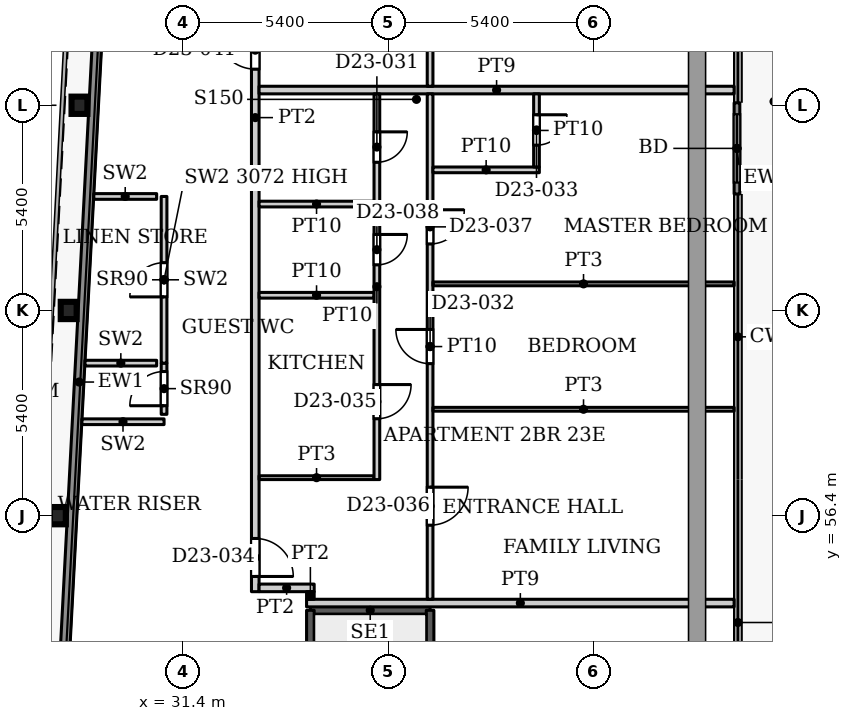
"""IFC4 building model, lengths in metres.
Left out: names, types, materials, properties, quantities, classifications, styles, units other than length and angle.
Written with IfcOpenShell. Run it as: python <this file> out.ifc"""

import sys

from ifc_helpers import new_model, si_unit, direction, frame, frame_2d, origin, origin_2d, place, context, subcontext, project, spatial, rectangle, i_section, extrude, source, transform, mapped, element, fill, save


model = new_model("IFC4")
c1 = context("Model", 3, precision=1e-05, world=origin(), true_north=direction((0.0, 1.0)))
c2 = subcontext(c1, "Body", "Model", "MODEL_VIEW")
j1 = project(units=[si_unit("LENGTHUNIT", "METRE"), si_unit("PLANEANGLEUNIT", "RADIAN")], contexts=[c1])
p1 = place(None, origin())
s1 = spatial("IfcSite", under=j1, at=p1, CompositionType="ELEMENT")
p2 = place(p1, origin())
s2 = spatial("IfcBuilding", under=s1, at=p2, CompositionType="ELEMENT")
p3 = place(p2, frame((0.0, 0.0, 101.9)))
s3 = spatial("IfcBuildingStorey", under=s2, at=p3, CompositionType="ELEMENT", Elevation=101.9)
for number, where, z_axis, x_axis in (
    (1, (28.106, 56.4, 0.0), (0.0, 0.0, 1.0), (1.0, 0.0, 0.0)),
    (2, (28.39, 61.8, 0.0), (0.0, 0.0, 1.0), (1.0, 0.0, 0.0)),
    (3, (28.674, 67.2, 0.0), (0.0, 0.0, 1.0), (1.0, 0.0, 0.0)),
):
    element("IfcColumn", number, at=place(p3, frame(where, z_axis=z_axis, x_axis=x_axis)), inside=s3, PredefinedType="COLUMN", context=c2, shape_type="SweptSolid", body=[
        extrude(i_section(OverallWidth=0.418, OverallDepth=0.455, WebThickness=0.042, FlangeThickness=0.068, FilletRadius=0.014, at=origin_2d()), origin(), (0.0, 0.0, 1.0), 3.9),
    ])
p4 = place(p3, frame((45.975, 67.265, 0.0), z_axis=(0.0, 0.0, 1.0), x_axis=(0.0, -1.0, 0.0)))
e4 = element("IfcWall", 4, at=p4, inside=s3, PredefinedType="SOLIDWALL", context=c2, shape_type="SweptSolid", body=[
    extrude(rectangle(XDim=2.4, YDim=0.15, at=frame_2d((1.2, 0.0))), origin(), (0.0, 0.0, 1.0), 3.75),
])
p5 = place(p4, frame((0.3, 0.0, 0.0)))
e5 = element("IfcOpeningElement", 5, at=p5, cuts=e4, PredefinedType="OPENING", context=c2, shape_type="SweptSolid", body=[
    extrude(rectangle(XDim=1.8, YDim=2.4, at=frame_2d((0.9, 1.2))), frame((0.0, 0.085, 0.0), z_axis=(0.0, -1.0, 0.0), x_axis=(1.0, 0.0, 0.0)), (0.0, 0.0, 1.0), 0.17),
])
p6 = place(p3, frame((27.195, 31.969, 0.0), z_axis=(0.0, 0.0, 1.0), x_axis=(0.052559748861, 0.998617781135, 0.0)))
e6 = element("IfcWall", 6, at=p6, inside=s3, PredefinedType="SOLIDWALL", context=c2, shape_type="SweptSolid", body=[
    extrude(rectangle(XDim=55.972, YDim=0.25, at=frame_2d((27.986, 0.0))), origin(), (0.0, 0.0, 1.0), 3.75),
])
p7 = place(p3, frame((34.75, 53.91, 0.0), z_axis=(0.0, 0.0, 1.0), x_axis=(1.0, 0.0, 0.0)))
e7 = element("IfcWall", 7, at=p7, inside=s3, PredefinedType="SHEAR", context=c2, shape_type="SweptSolid", body=[
    extrude(rectangle(XDim=3.15, YDim=0.2, at=frame_2d((1.575, 0.0))), origin(), (0.0, 0.0, 1.0), 3.9),
])
p8 = place(p3, frame((34.75, 47.5, 0.0), z_axis=(0.0, 0.0, 1.0), x_axis=(0.0, 1.0, 0.0)))
e8 = element("IfcWall", 8, at=p8, inside=s3, PredefinedType="SHEAR", context=c2, shape_type="SweptSolid", body=[
    extrude(rectangle(XDim=6.41, YDim=0.2, at=frame_2d((3.205, 0.0))), origin(), (0.0, 0.0, 1.0), 3.9),
])
p9 = place(p3, frame((37.9, 44.75, 0.0), z_axis=(0.0, 0.0, 1.0), x_axis=(0.0, 1.0, 0.0)))
e9 = element("IfcWall", 9, at=p9, inside=s3, PredefinedType="SHEAR", context=c2, shape_type="SweptSolid", body=[
    extrude(rectangle(XDim=9.16, YDim=0.2, at=frame_2d((4.58, 0.0))), origin(), (0.0, 0.0, 1.0), 3.9),
])
p10 = place(p3, frame((28.739, 58.872, 0.0), z_axis=(0.0, 0.0, 1.0), x_axis=(1.0, 0.0, 0.0)))
e10 = element("IfcWall", 10, at=p10, inside=s3, PredefinedType="PARTITIONING", context=c2, shape_type="SweptSolid", body=[
    extrude(rectangle(XDim=2.161, YDim=0.15, at=frame_2d((1.081, 0.0))), origin(), (0.0, 0.0, 1.0), 3.9),
])
p11 = place(p3, frame((30.9, 59.067, 0.0), z_axis=(0.0, 0.0, 1.0), x_axis=(0.0, 1.0, 0.0)))
e11 = element("IfcWall", 11, at=p11, inside=s3, PredefinedType="PARTITIONING", context=c2, shape_type="SweptSolid", body=[
    extrude(rectangle(XDim=1.347, YDim=0.15, at=frame_2d((0.674, 0.0))), origin(), (0.0, 0.0, 1.0), 3.9),
])
p12 = place(p11, frame((0.226, 0.0, 0.0)))
e12 = element("IfcOpeningElement", 12, at=p12, cuts=e11, PredefinedType="OPENING", context=c2, shape_type="SweptSolid", body=[
    extrude(rectangle(XDim=0.9, YDim=2.2, at=frame_2d((0.45, 1.1))), frame((0.0, 0.085, 0.0), z_axis=(0.0, -1.0, 0.0), x_axis=(1.0, 0.0, 0.0)), (0.0, 0.0, 1.0), 0.17),
])
p13 = place(p3, frame((28.82, 60.414, 0.0), z_axis=(0.0, 0.0, 1.0), x_axis=(1.0, 0.0, 0.0)))
e13 = element("IfcWall", 13, at=p13, inside=s3, PredefinedType="PARTITIONING", context=c2, shape_type="SweptSolid", body=[
    extrude(rectangle(XDim=1.885, YDim=0.15, at=frame_2d((0.942, 0.0))), origin(), (0.0, 0.0, 1.0), 3.9),
])
p14 = place(p3, frame((30.9, 60.414, 0.0), z_axis=(0.0, 0.0, 1.0), x_axis=(0.0, 1.0, 0.0)))
e14 = element("IfcWall", 14, at=p14, inside=s3, PredefinedType="PARTITIONING", context=c2, shape_type="SweptSolid", body=[
    extrude(rectangle(XDim=4.386, YDim=0.15, at=frame_2d((2.193, 0.0))), origin(), (0.0, 0.0, 1.0), 3.072),
])
p15 = place(p14, frame((1.743, 0.0, 0.0)))
e15 = element("IfcOpeningElement", 15, at=p15, cuts=e14, PredefinedType="OPENING", context=c2, shape_type="SweptSolid", body=[
    extrude(rectangle(XDim=0.9, YDim=2.2, at=frame_2d((0.45, 1.1))), frame((0.0, 0.085, 0.0), z_axis=(0.0, -1.0, 0.0), x_axis=(1.0, 0.0, 0.0)), (0.0, 0.0, 1.0), 0.17),
])
p16 = place(p3, frame((29.051, 64.8, 0.0), z_axis=(0.0, 0.0, 1.0), x_axis=(1.0, 0.0, 0.0)))
e16 = element("IfcWall", 16, at=p16, inside=s3, PredefinedType="PARTITIONING", context=c2, shape_type="SweptSolid", body=[
    extrude(rectangle(XDim=1.654, YDim=0.15, at=frame_2d((0.827, 0.0))), origin(), (0.0, 0.0, 1.0), 3.9),
])
p17 = place(p3, frame((33.3, 54.4, 0.0), z_axis=(0.0, 0.0, 1.0), x_axis=(0.0, 1.0, 0.0)))
e17 = element("IfcWall", 17, at=p17, inside=s3, PredefinedType="PARTITIONING", context=c2, shape_type="SweptSolid", body=[
    extrude(rectangle(XDim=24.95, YDim=0.2, at=frame_2d((12.475, 0.0))), origin(), (0.0, 0.0, 1.0), 3.6),
])
p18 = place(p17, frame((0.4, 0.0, 0.0)))
e18 = element("IfcOpeningElement", 18, at=p18, cuts=e17, PredefinedType="OPENING", context=c2, shape_type="SweptSolid", body=[
    extrude(rectangle(XDim=1.0, YDim=2.1, at=frame_2d((0.5, 1.05))), frame((0.0, 0.11, 0.0), z_axis=(0.0, -1.0, 0.0), x_axis=(1.0, 0.0, 0.0)), (0.0, 0.0, 1.0), 0.22),
])
p19 = place(p17, frame((13.75, 0.0, 0.0)))
e19 = element("IfcOpeningElement", 19, at=p19, cuts=e17, PredefinedType="OPENING", context=c2, shape_type="SweptSolid", body=[
    extrude(rectangle(XDim=1.0, YDim=2.1, at=frame_2d((0.5, 1.05))), frame((0.0, 0.11, 0.0), z_axis=(0.0, -1.0, 0.0), x_axis=(1.0, 0.0, 0.0)), (0.0, 0.0, 1.0), 0.22),
])
p20 = place(p3, frame((33.4, 54.5, 0.0), z_axis=(0.0, 0.0, 1.0), x_axis=(1.0, 0.0, 0.0)))
e20 = element("IfcWall", 20, at=p20, inside=s3, PredefinedType="PARTITIONING", context=c2, shape_type="SweptSolid", body=[
    extrude(rectangle(XDim=1.45, YDim=0.2, at=frame_2d((0.725, 0.0))), origin(), (0.0, 0.0, 1.0), 3.6),
])
p21 = place(p3, frame((33.4, 57.4, 0.0), z_axis=(0.0, 0.0, 1.0), x_axis=(1.0, 0.0, 0.0)))
e21 = element("IfcWall", 21, at=p21, inside=s3, PredefinedType="PARTITIONING", context=c2, shape_type="SweptSolid", body=[
    extrude(rectangle(XDim=3.025, YDim=0.1, at=frame_2d((1.513, 0.0))), origin(), (0.0, 0.0, 1.0), 3.6),
])
for number, where, z_axis, x_axis in (
    (22, (33.4, 62.2, 0.0), (0.0, 0.0, 1.0), (1.0, 0.0, 0.0)),
    (23, (33.4, 64.6, 0.0), (0.0, 0.0, 1.0), (1.0, 0.0, 0.0)),
):
    element("IfcWall", number, at=place(p3, frame(where, z_axis=z_axis, x_axis=x_axis)), inside=s3, PredefinedType="PARTITIONING", context=c2, shape_type="SweptSolid", body=[
        extrude(rectangle(XDim=3.025, YDim=0.15, at=frame_2d((1.513, 0.0))), origin(), (0.0, 0.0, 1.0), 3.6),
    ])
p22 = place(p3, frame((33.4, 67.6, 0.0), z_axis=(0.0, 0.0, 1.0), x_axis=(1.0, 0.0, 0.0)))
e24 = element("IfcWall", 24, at=p22, inside=s3, PredefinedType="PARTITIONING", context=c2, shape_type="SweptSolid", body=[
    extrude(rectangle(XDim=12.5, YDim=0.2, at=frame_2d((6.25, 0.0))), origin(), (0.0, 0.0, 1.0), 3.6),
])
p23 = place(p3, frame((34.65, 54.1, 0.0), z_axis=(0.0, 0.0, 1.0), x_axis=(1.0, 0.0, 0.0)))
e25 = element("IfcWall", 25, at=p23, inside=s3, PredefinedType="PARTITIONING", context=c2, shape_type="SweptSolid", body=[
    extrude(rectangle(XDim=11.25, YDim=0.2, at=frame_2d((5.625, 0.0))), origin(), (0.0, 0.0, 1.0), 3.6),
])
p24 = place(p3, frame((34.75, 54.2, 0.0), z_axis=(0.0, 0.0, 1.0), x_axis=(0.0, 1.0, 0.0)))
e26 = element("IfcWall", 26, at=p24, inside=s3, PredefinedType="PARTITIONING", context=c2, shape_type="SweptSolid", body=[
    extrude(rectangle(XDim=0.2, YDim=0.2, at=frame_2d((0.1, 0.0))), origin(), (0.0, 0.0, 1.0), 3.6),
])
p25 = place(p3, frame((36.5, 57.35, 0.0), z_axis=(0.0, 0.0, 1.0), x_axis=(0.0, 1.0, 0.0)))
e27 = element("IfcWall", 27, at=p25, inside=s3, PredefinedType="PARTITIONING", context=c2, shape_type="SweptSolid", body=[
    extrude(rectangle(XDim=10.15, YDim=0.15, at=frame_2d((5.075, 0.0))), origin(), (0.0, 0.0, 1.0), 3.6),
])
p26 = place(p25, frame((8.35, 0.0, 0.0)))
e28 = element("IfcOpeningElement", 28, at=p26, cuts=e27, PredefinedType="OPENING", context=c2, shape_type="SweptSolid", body=[
    extrude(rectangle(XDim=0.8, YDim=2.1, at=frame_2d((0.4, 1.05))), frame((0.0, 0.085, 0.0), z_axis=(0.0, -1.0, 0.0), x_axis=(1.0, 0.0, 0.0)), (0.0, 0.0, 1.0), 0.17),
])
p27 = place(p25, frame((1.6, 0.0, 0.0)))
e29 = element("IfcOpeningElement", 29, at=p27, cuts=e27, PredefinedType="OPENING", context=c2, shape_type="SweptSolid", body=[
    extrude(rectangle(XDim=0.9, YDim=2.1, at=frame_2d((0.45, 1.05))), frame((0.0, 0.085, 0.0), z_axis=(0.0, -1.0, 0.0), x_axis=(1.0, 0.0, 0.0)), (0.0, 0.0, 1.0), 0.17),
])
p28 = place(p25, frame((5.65, 0.0, 0.0)))
e30 = element("IfcOpeningElement", 30, at=p28, cuts=e27, PredefinedType="OPENING", context=c2, shape_type="SweptSolid", body=[
    extrude(rectangle(XDim=0.8, YDim=2.1, at=frame_2d((0.4, 1.05))), frame((0.0, 0.085, 0.0), z_axis=(0.0, -1.0, 0.0), x_axis=(1.0, 0.0, 0.0)), (0.0, 0.0, 1.0), 0.17),
])
p29 = place(p3, frame((37.9, 54.2, 0.0), z_axis=(0.0, 0.0, 1.0), x_axis=(0.0, 1.0, 0.0)))
e31 = element("IfcWall", 31, at=p29, inside=s3, PredefinedType="PARTITIONING", context=c2, shape_type="SweptSolid", body=[
    extrude(rectangle(XDim=13.3, YDim=0.15, at=frame_2d((6.65, 0.0))), origin(), (0.0, 0.0, 1.0), 3.6),
])
p30 = place(p29, frame((6.2, 0.0, 0.0)))
e32 = element("IfcOpeningElement", 32, at=p30, cuts=e31, PredefinedType="OPENING", context=c2, shape_type="SweptSolid", body=[
    extrude(rectangle(XDim=0.9, YDim=2.1, at=frame_2d((0.45, 1.05))), frame((0.0, 0.085, 0.0), z_axis=(0.0, -1.0, 0.0), x_axis=(1.0, 0.0, 0.0)), (0.0, 0.0, 1.0), 0.17),
])
p31 = place(p29, frame((1.95, 0.0, 0.0)))
e33 = element("IfcOpeningElement", 33, at=p31, cuts=e31, PredefinedType="OPENING", context=c2, shape_type="SweptSolid", body=[
    extrude(rectangle(XDim=1.0, YDim=2.1, at=frame_2d((0.5, 1.05))), frame((0.0, 0.085, 0.0), z_axis=(0.0, -1.0, 0.0), x_axis=(1.0, 0.0, 0.0)), (0.0, 0.0, 1.0), 0.17),
])
p32 = place(p29, frame((9.35, 0.0, 0.0)))
e34 = element("IfcOpeningElement", 34, at=p32, cuts=e31, PredefinedType="OPENING", context=c2, shape_type="SweptSolid", body=[
    extrude(rectangle(XDim=0.9, YDim=2.1, at=frame_2d((0.45, 1.05))), frame((0.0, 0.085, 0.0), z_axis=(0.0, -1.0, 0.0), x_axis=(1.0, 0.0, 0.0)), (0.0, 0.0, 1.0), 0.17),
])
p33 = place(p3, frame((37.9, 67.7, 0.0), z_axis=(0.0, 0.0, 1.0), x_axis=(0.0, 1.0, 0.0)))
e35 = element("IfcWall", 35, at=p33, inside=s3, PredefinedType="PARTITIONING", context=c2, shape_type="SweptSolid", body=[
    extrude(rectangle(XDim=11.55, YDim=0.15, at=frame_2d((5.775, 0.0))), origin(), (0.0, 0.0, 1.0), 3.6),
])
p34 = place(p33, frame((4.55, 0.0, 0.0)))
e36 = element("IfcOpeningElement", 36, at=p34, cuts=e35, PredefinedType="OPENING", context=c2, shape_type="SweptSolid", body=[
    extrude(rectangle(XDim=0.9, YDim=2.1, at=frame_2d((0.45, 1.05))), frame((0.0, 0.085, 0.0), z_axis=(0.0, -1.0, 0.0), x_axis=(1.0, 0.0, 0.0)), (0.0, 0.0, 1.0), 0.17),
])
p35 = place(p33, frame((8.7, 0.0, 0.0)))
e37 = element("IfcOpeningElement", 37, at=p35, cuts=e35, PredefinedType="OPENING", context=c2, shape_type="SweptSolid", body=[
    extrude(rectangle(XDim=1.0, YDim=2.1, at=frame_2d((0.5, 1.05))), frame((0.0, 0.085, 0.0), z_axis=(0.0, -1.0, 0.0), x_axis=(1.0, 0.0, 0.0)), (0.0, 0.0, 1.0), 0.17),
])
p36 = place(p33, frame((1.1, 0.0, 0.0)))
e38 = element("IfcOpeningElement", 38, at=p36, cuts=e35, PredefinedType="OPENING", context=c2, shape_type="SweptSolid", body=[
    extrude(rectangle(XDim=0.9, YDim=2.1, at=frame_2d((0.45, 1.05))), frame((0.0, 0.085, 0.0), z_axis=(0.0, -1.0, 0.0), x_axis=(1.0, 0.0, 0.0)), (0.0, 0.0, 1.0), 0.17),
])
for number, where, z_axis, x_axis in (
    (39, (37.975, 59.2, 0.0), (0.0, 0.0, 1.0), (1.0, 0.0, 0.0)),
    (40, (37.975, 62.5, 0.0), (0.0, 0.0, 1.0), (1.0, 0.0, 0.0)),
):
    element("IfcWall", number, at=place(p3, frame(where, z_axis=z_axis, x_axis=x_axis)), inside=s3, PredefinedType="PARTITIONING", context=c2, shape_type="SweptSolid", body=[
        extrude(rectangle(XDim=7.925, YDim=0.1, at=frame_2d((3.962, 0.0))), origin(), (0.0, 0.0, 1.0), 3.6),
    ])
p37 = place(p3, frame((37.975, 65.5, 0.0), z_axis=(0.0, 0.0, 1.0), x_axis=(1.0, 0.0, 0.0)))
e41 = element("IfcWall", 41, at=p37, inside=s3, PredefinedType="PARTITIONING", context=c2, shape_type="SweptSolid", body=[
    extrude(rectangle(XDim=2.8, YDim=0.15, at=frame_2d((1.4, 0.0))), origin(), (0.0, 0.0, 1.0), 3.6),
])
p38 = place(p3, frame((40.7, 65.575, 0.0), z_axis=(0.0, 0.0, 1.0), x_axis=(0.0, 1.0, 0.0)))
e42 = element("IfcWall", 42, at=p38, inside=s3, PredefinedType="PARTITIONING", context=c2, shape_type="SweptSolid", body=[
    extrude(rectangle(XDim=1.925, YDim=0.15, at=frame_2d((0.962, 0.0))), origin(), (0.0, 0.0, 1.0), 3.6),
])
p39 = place(p38, frame((0.575, 0.0, 0.0)))
e43 = element("IfcOpeningElement", 43, at=p39, cuts=e42, PredefinedType="OPENING", context=c2, shape_type="SweptSolid", body=[
    extrude(rectangle(XDim=0.8, YDim=2.1, at=frame_2d((0.4, 1.05))), frame((0.0, 0.085, 0.0), z_axis=(0.0, -1.0, 0.0), x_axis=(1.0, 0.0, 0.0)), (0.0, 0.0, 1.0), 0.17),
])
m1 = source(origin(), c2, "Body", "SweptSolid", [
    extrude(rectangle(XDim=1.8, YDim=2.4, at=frame_2d((0.9, 1.2))), frame((0.0, 0.025, 0.0), z_axis=(0.0, -1.0, 0.0), x_axis=(1.0, 0.0, 0.0)), (0.0, 0.0, 1.0), 0.05),
])
p40 = place(p5, origin())
e44 = element("IfcDoor", 44, at=p40, inside=s3, OperationType="SLIDING_TO_LEFT", PredefinedType="DOOR", context=c2, shape_type="MappedRepresentation", body=[
    mapped(m1, transform((0.0, 0.0, 0.0), x_axis=(1.0, 0.0, 0.0), y_axis=(0.0, 1.0, 0.0), z_axis=(0.0, 0.0, 1.0), scale=1.0)),
])
fill(e5, e44)
m2 = source(origin(), c2, "Body", "SweptSolid", [
    extrude(rectangle(XDim=0.9, YDim=2.2, at=frame_2d((0.45, 1.1))), frame((0.0, 0.025, 0.0), z_axis=(0.0, -1.0, 0.0), x_axis=(1.0, 0.0, 0.0)), (0.0, 0.0, 1.0), 0.05),
])
p41 = place(p12, origin())
e45 = element("IfcDoor", 45, at=p41, inside=s3, OperationType="SINGLE_SWING_LEFT", PredefinedType="DOOR", context=c2, shape_type="MappedRepresentation", body=[
    mapped(m2, transform((0.0, 0.0, 0.0), x_axis=(1.0, 0.0, 0.0), y_axis=(0.0, 1.0, 0.0), z_axis=(0.0, 0.0, 1.0), scale=1.0)),
])
fill(e12, e45)
p42 = place(p15, origin())
e46 = element("IfcDoor", 46, at=p42, inside=s3, OperationType="SINGLE_SWING_LEFT", PredefinedType="DOOR", context=c2, shape_type="MappedRepresentation", body=[
    mapped(m2, transform((0.0, 0.0, 0.0), x_axis=(1.0, 0.0, 0.0), y_axis=(0.0, 1.0, 0.0), z_axis=(0.0, 0.0, 1.0), scale=1.0)),
])
fill(e15, e46)
m3 = source(origin(), c2, "Body", "SweptSolid", [
    extrude(rectangle(XDim=0.8, YDim=2.1, at=frame_2d((0.4, 1.05))), frame((0.0, 0.025, 0.0), z_axis=(0.0, -1.0, 0.0), x_axis=(1.0, 0.0, 0.0)), (0.0, 0.0, 1.0), 0.05),
])
p43 = place(p26, origin())
e47 = element("IfcDoor", 47, at=p43, inside=s3, OperationType="SINGLE_SWING_RIGHT", PredefinedType="DOOR", context=c2, shape_type="MappedRepresentation", body=[
    mapped(m3, transform((0.0, 0.0, 0.0), x_axis=(1.0, 0.0, 0.0), y_axis=(0.0, 1.0, 0.0), z_axis=(0.0, 0.0, 1.0), scale=1.0)),
])
fill(e28, e47)
m4 = source(origin(), c2, "Body", "SweptSolid", [
    extrude(rectangle(XDim=0.9, YDim=2.1, at=frame_2d((0.45, 1.05))), frame((0.0, 0.025, 0.0), z_axis=(0.0, -1.0, 0.0), x_axis=(1.0, 0.0, 0.0)), (0.0, 0.0, 1.0), 0.05),
])
p44 = place(p30, origin())
e48 = element("IfcDoor", 48, at=p44, inside=s3, OperationType="SINGLE_SWING_LEFT", PredefinedType="DOOR", context=c2, shape_type="MappedRepresentation", body=[
    mapped(m4, transform((0.0, 0.0, 0.0), x_axis=(1.0, 0.0, 0.0), y_axis=(0.0, 1.0, 0.0), z_axis=(0.0, 0.0, 1.0), scale=1.0)),
])
fill(e32, e48)
p45 = place(p39, origin())
e49 = element("IfcDoor", 49, at=p45, inside=s3, OperationType="SINGLE_SWING_RIGHT", PredefinedType="DOOR", context=c2, shape_type="MappedRepresentation", body=[
    mapped(m3, transform((0.0, 0.0, 0.0), x_axis=(1.0, 0.0, 0.0), y_axis=(0.0, 1.0, 0.0), z_axis=(0.0, 0.0, 1.0), scale=1.0)),
])
fill(e43, e49)
m5 = source(origin(), c2, "Body", "SweptSolid", [
    extrude(rectangle(XDim=1.0, YDim=2.1, at=frame_2d((0.5, 1.05))), frame((0.0, 0.025, 0.0), z_axis=(0.0, -1.0, 0.0), x_axis=(1.0, 0.0, 0.0)), (0.0, 0.0, 1.0), 0.05),
])
p46 = place(p18, origin())
e50 = element("IfcDoor", 50, at=p46, inside=s3, OperationType="SINGLE_SWING_RIGHT", PredefinedType="DOOR", context=c2, shape_type="MappedRepresentation", body=[
    mapped(m5, transform((0.0, 0.0, 0.0), x_axis=(1.0, 0.0, 0.0), y_axis=(0.0, 1.0, 0.0), z_axis=(0.0, 0.0, 1.0), scale=1.0)),
])
fill(e18, e50)
p47 = place(p27, origin())
e51 = element("IfcDoor", 51, at=p47, inside=s3, OperationType="SINGLE_SWING_RIGHT", PredefinedType="DOOR", context=c2, shape_type="MappedRepresentation", body=[
    mapped(m4, transform((0.0, 0.0, 0.0), x_axis=(1.0, 0.0, 0.0), y_axis=(0.0, 1.0, 0.0), z_axis=(0.0, 0.0, 1.0), scale=1.0)),
])
fill(e29, e51)
m6 = source(origin(), c2, "Body", "SweptSolid", [
    extrude(rectangle(XDim=1.0, YDim=2.1, at=frame_2d((0.5, 1.05))), frame((0.0, 0.025, 0.0), z_axis=(0.0, -1.0, 0.0), x_axis=(1.0, 0.0, 0.0)), (0.0, 0.0, 1.0), 0.05),
])
p48 = place(p31, origin())
e52 = element("IfcDoor", 52, at=p48, inside=s3, OperationType="SINGLE_SWING_RIGHT", PredefinedType="DOOR", context=c2, shape_type="MappedRepresentation", body=[
    mapped(m6, transform((0.0, 0.0, 0.0), x_axis=(1.0, 0.0, 0.0), y_axis=(0.0, 1.0, 0.0), z_axis=(0.0, 0.0, 1.0), scale=1.0)),
])
fill(e33, e52)
p49 = place(p32, origin())
e53 = element("IfcDoor", 53, at=p49, inside=s3, OperationType="SINGLE_SWING_RIGHT", PredefinedType="DOOR", context=c2, shape_type="MappedRepresentation", body=[
    mapped(m4, transform((0.0, 0.0, 0.0), x_axis=(1.0, 0.0, 0.0), y_axis=(0.0, 1.0, 0.0), z_axis=(0.0, 0.0, 1.0), scale=1.0)),
])
fill(e34, e53)
p50 = place(p28, origin())
e54 = element("IfcDoor", 54, at=p50, inside=s3, OperationType="SINGLE_SWING_RIGHT", PredefinedType="DOOR", context=c2, shape_type="MappedRepresentation", body=[
    mapped(m3, transform((0.0, 0.0, 0.0), x_axis=(1.0, 0.0, 0.0), y_axis=(0.0, 1.0, 0.0), z_axis=(0.0, 0.0, 1.0), scale=1.0)),
])
fill(e30, e54)
p51 = place(p19, origin())
e55 = element("IfcDoor", 55, at=p51, inside=s3, OperationType="SINGLE_SWING_LEFT", PredefinedType="DOOR", context=c2, shape_type="MappedRepresentation", body=[
    mapped(m5, transform((0.0, 0.0, 0.0), x_axis=(1.0, 0.0, 0.0), y_axis=(0.0, 1.0, 0.0), z_axis=(0.0, 0.0, 1.0), scale=1.0)),
])
fill(e19, e55)
save(model, sys.argv[1])
